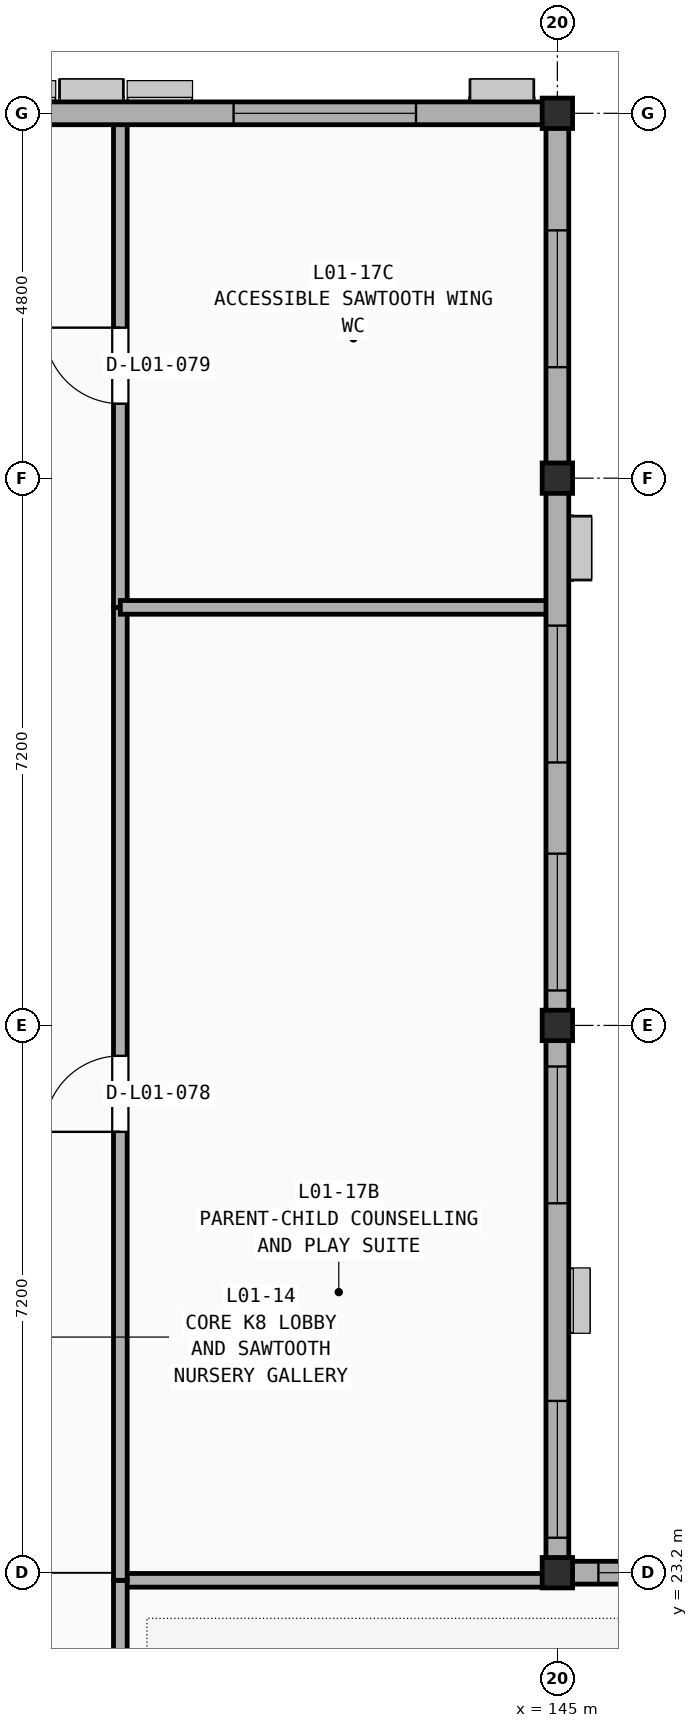
"""IFC4 building model, lengths in metres.
Left out: names, types, materials, properties, quantities, classifications, styles, units other than length and angle.
Written with IfcOpenShell. Run it as: python <this file> out.ifc"""

import sys

from ifc_helpers import new_model, si_unit, direction, frame, frame_2d, origin, origin_2d, place, context, subcontext, project, spatial, rectangle, extrude, element, fill, save


model = new_model("IFC4")
c1 = context("Model", 3, precision=1e-05, world=origin(), true_north=direction((0.0, 1.0)))
c2 = subcontext(c1, "Body", "Model", "MODEL_VIEW")
j1 = project(units=[si_unit("LENGTHUNIT", "METRE"), si_unit("PLANEANGLEUNIT", "RADIAN")], contexts=[c1])
p1 = place(None, origin())
s1 = spatial("IfcSite", under=j1, at=p1, CompositionType="ELEMENT")
p2 = place(p1, origin())
s2 = spatial("IfcBuilding", under=s1, at=p2, CompositionType="ELEMENT")
p3 = place(p2, frame((0.0, 0.0, 5.4)))
s3 = spatial("IfcBuildingStorey", under=s2, at=p3, CompositionType="ELEMENT", Elevation=5.4)
for number, where, z_axis, x_axis in (
    (1, (145.0, 23.2, 0.0), (0.0, 0.0, 1.0), (1.0, 0.0, 0.0)),
    (2, (145.0, 30.4, 0.0), (0.0, 0.0, 1.0), (1.0, 0.0, 0.0)),
    (3, (145.0, 37.6, 0.0), (0.0, 0.0, 1.0), (1.0, 0.0, 0.0)),
    (4, (145.0, 42.4, 0.0), (0.0, 0.0, 1.0), (1.0, 0.0, 0.0)),
):
    element("IfcColumn", number, at=place(p3, frame(where, z_axis=z_axis, x_axis=x_axis)), inside=s3, PredefinedType="COLUMN", context=c2, shape_type="SweptSolid", body=[
        extrude(rectangle(XDim=0.4, YDim=0.4, at=origin_2d()), origin(), (0.0, 0.0, 1.0), 4.2),
    ])
p4 = place(p3, frame((139.25, 23.1, 0.0), z_axis=(0.0, 0.0, 1.0), x_axis=(1.0, 0.0, 0.0)))
e5 = element("IfcWall", 5, at=p4, inside=s3, PredefinedType="PARTITIONING", context=c2, shape_type="SweptSolid", body=[
    extrude(rectangle(XDim=5.61, YDim=0.18, at=frame_2d((2.805, 0.0))), origin(), (0.0, 0.0, 1.0), 3.59),
])
p5 = place(p3, frame((139.25, 16.65, 0.0), z_axis=(0.0, 0.0, 1.0), x_axis=(0.0, 1.0, 0.0)))
e6 = element("IfcWall", 6, at=p5, inside=s3, PredefinedType="PARTITIONING", context=c2, shape_type="SweptSolid", body=[
    extrude(rectangle(XDim=6.45, YDim=0.18, at=frame_2d((3.225, 0.0))), origin(), (0.0, 0.0, 1.0), 3.67),
])
p6 = place(p3, frame((139.25, 23.1, 0.0), z_axis=(0.0, 0.0, 1.0), x_axis=(0.0, 1.0, 0.0)))
e7 = element("IfcWall", 7, at=p6, inside=s3, PredefinedType="PARTITIONING", context=c2, shape_type="SweptSolid", body=[
    extrude(rectangle(XDim=12.8, YDim=0.18, at=frame_2d((6.4, 0.0))), origin(), (0.0, 0.0, 1.0), 3.67),
])
p7 = place(p6, frame((5.9, 0.0, -0.01)))
e8 = element("IfcOpeningElement", 8, at=p7, cuts=e7, PredefinedType="OPENING", context=c2, shape_type="SweptSolid", body=[
    extrude(rectangle(XDim=1.0, YDim=2.16, at=frame_2d((0.5, 1.08))), frame((0.0, 0.1, 0.0), z_axis=(0.0, -1.0, 0.0), x_axis=(1.0, 0.0, 0.0)), (0.0, 0.0, 1.0), 0.2),
])
p8 = place(p3, frame((139.25, 35.9, 0.0), z_axis=(0.0, 0.0, 1.0), x_axis=(0.0, 1.0, 0.0)))
e9 = element("IfcWall", 9, at=p8, inside=s3, PredefinedType="PARTITIONING", context=c2, shape_type="SweptSolid", body=[
    extrude(rectangle(XDim=6.36, YDim=0.18, at=frame_2d((3.18, 0.0))), origin(), (0.0, 0.0, 1.0), 3.67),
])
p9 = place(p8, frame((2.68, 0.0, -0.01)))
e10 = element("IfcOpeningElement", 10, at=p9, cuts=e9, PredefinedType="OPENING", context=c2, shape_type="SweptSolid", body=[
    extrude(rectangle(XDim=1.0, YDim=2.16, at=frame_2d((0.5, 1.08))), frame((0.0, 0.1, 0.0), z_axis=(0.0, -1.0, 0.0), x_axis=(1.0, 0.0, 0.0)), (0.0, 0.0, 1.0), 0.2),
])
p10 = place(p3, frame((139.25, 35.9, 0.0), z_axis=(0.0, 0.0, 1.0), x_axis=(1.0, 0.0, 0.0)))
e11 = element("IfcWall", 11, at=p10, inside=s3, PredefinedType="PARTITIONING", context=c2, shape_type="SweptSolid", body=[
    extrude(rectangle(XDim=5.61, YDim=0.18, at=frame_2d((2.805, 0.0))), origin(), (0.0, 0.0, 1.0), 3.59),
])
p11 = place(p3, frame((152.8, 23.2, 0.0), z_axis=(0.0, 0.0, 1.0), x_axis=(-1.0, 0.0, 0.0)))
e12 = element("IfcWall", 12, at=p11, inside=s3, PredefinedType="SOLIDWALL", context=c2, shape_type="SweptSolid", body=[
    extrude(rectangle(XDim=7.8, YDim=0.3, at=frame_2d((3.9, 0.0))), origin(), (0.0, 0.0, 1.0), 3.59),
])
p12 = place(p11, frame((0.46, 0.0, 0.9)))
e13 = element("IfcOpeningElement", 13, at=p12, cuts=e12, PredefinedType="OPENING", context=c2, shape_type="SweptSolid", body=[
    extrude(rectangle(XDim=2.4, YDim=2.25, at=frame_2d((1.2, 1.125))), frame((0.0, 0.16, 0.0), z_axis=(0.0, -1.0, 0.0), x_axis=(1.0, 0.0, 0.0)), (0.0, 0.0, 1.0), 0.32),
])
p13 = place(p11, frame((4.86, 0.0, 0.9)))
e14 = element("IfcOpeningElement", 14, at=p13, cuts=e12, PredefinedType="OPENING", context=c2, shape_type="SweptSolid", body=[
    extrude(rectangle(XDim=2.4, YDim=2.25, at=frame_2d((1.2, 1.125))), frame((0.0, 0.16, 0.0), z_axis=(0.0, -1.0, 0.0), x_axis=(1.0, 0.0, 0.0)), (0.0, 0.0, 1.0), 0.32),
])
p14 = place(p3, frame((145.0, 42.4, 0.0), z_axis=(0.0, 0.0, 1.0), x_axis=(-1.0, 0.0, 0.0)))
e15 = element("IfcWall", 15, at=p14, inside=s3, PredefinedType="SOLIDWALL", context=c2, shape_type="SweptSolid", body=[
    extrude(rectangle(XDim=7.8, YDim=0.3, at=frame_2d((3.9, 0.0))), origin(), (0.0, 0.0, 1.0), 3.59),
])
p15 = place(p14, frame((1.86, 0.0, 0.9)))
e16 = element("IfcOpeningElement", 16, at=p15, cuts=e15, PredefinedType="OPENING", context=c2, shape_type="SweptSolid", body=[
    extrude(rectangle(XDim=2.4, YDim=2.25, at=frame_2d((1.2, 1.125))), frame((0.0, 0.16, 0.0), z_axis=(0.0, -1.0, 0.0), x_axis=(1.0, 0.0, 0.0)), (0.0, 0.0, 1.0), 0.32),
])
p16 = place(p3, frame((145.0, 23.2, 0.0), z_axis=(0.0, 0.0, 1.0), x_axis=(0.0, 1.0, 0.0)))
e17 = element("IfcWall", 17, at=p16, inside=s3, PredefinedType="SOLIDWALL", context=c2, shape_type="SweptSolid", body=[
    extrude(rectangle(XDim=7.2, YDim=0.3, at=frame_2d((3.6, 0.0))), origin(), (0.0, 0.0, 1.0), 3.59),
])
p17 = place(p16, frame((0.46, 0.0, 0.9)))
e18 = element("IfcOpeningElement", 18, at=p17, cuts=e17, PredefinedType="OPENING", context=c2, shape_type="SweptSolid", body=[
    extrude(rectangle(XDim=1.8, YDim=2.25, at=frame_2d((0.9, 1.125))), frame((0.0, 0.16, 0.0), z_axis=(0.0, -1.0, 0.0), x_axis=(1.0, 0.0, 0.0)), (0.0, 0.0, 1.0), 0.32),
])
p18 = place(p16, frame((4.86, 0.0, 0.9)))
e19 = element("IfcOpeningElement", 19, at=p18, cuts=e17, PredefinedType="OPENING", context=c2, shape_type="SweptSolid", body=[
    extrude(rectangle(XDim=1.8, YDim=2.25, at=frame_2d((0.9, 1.125))), frame((0.0, 0.16, 0.0), z_axis=(0.0, -1.0, 0.0), x_axis=(1.0, 0.0, 0.0)), (0.0, 0.0, 1.0), 0.32),
])
p19 = place(p3, frame((145.0, 30.4, 0.0), z_axis=(0.0, 0.0, 1.0), x_axis=(0.0, 1.0, 0.0)))
e20 = element("IfcWall", 20, at=p19, inside=s3, PredefinedType="SOLIDWALL", context=c2, shape_type="SweptSolid", body=[
    extrude(rectangle(XDim=7.2, YDim=0.3, at=frame_2d((3.6, 0.0))), origin(), (0.0, 0.0, 1.0), 3.59),
])
p20 = place(p19, frame((0.46, 0.0, 0.9)))
e21 = element("IfcOpeningElement", 21, at=p20, cuts=e20, PredefinedType="OPENING", context=c2, shape_type="SweptSolid", body=[
    extrude(rectangle(XDim=1.8, YDim=2.25, at=frame_2d((0.9, 1.125))), frame((0.0, 0.16, 0.0), z_axis=(0.0, -1.0, 0.0), x_axis=(1.0, 0.0, 0.0)), (0.0, 0.0, 1.0), 0.32),
])
p21 = place(p19, frame((3.46, 0.0, 0.9)))
e22 = element("IfcOpeningElement", 22, at=p21, cuts=e20, PredefinedType="OPENING", context=c2, shape_type="SweptSolid", body=[
    extrude(rectangle(XDim=1.8, YDim=2.25, at=frame_2d((0.9, 1.125))), frame((0.0, 0.16, 0.0), z_axis=(0.0, -1.0, 0.0), x_axis=(1.0, 0.0, 0.0)), (0.0, 0.0, 1.0), 0.32),
])
p22 = place(p3, frame((145.0, 37.6, 0.0), z_axis=(0.0, 0.0, 1.0), x_axis=(0.0, 1.0, 0.0)))
e23 = element("IfcWall", 23, at=p22, inside=s3, PredefinedType="SOLIDWALL", context=c2, shape_type="SweptSolid", body=[
    extrude(rectangle(XDim=4.8, YDim=0.3, at=frame_2d((2.4, 0.0))), origin(), (0.0, 0.0, 1.0), 3.59),
])
p23 = place(p22, frame((1.46, 0.0, 0.9)))
e24 = element("IfcOpeningElement", 24, at=p23, cuts=e23, PredefinedType="OPENING", context=c2, shape_type="SweptSolid", body=[
    extrude(rectangle(XDim=1.8, YDim=2.25, at=frame_2d((0.9, 1.125))), frame((0.0, 0.16, 0.0), z_axis=(0.0, -1.0, 0.0), x_axis=(1.0, 0.0, 0.0)), (0.0, 0.0, 1.0), 0.32),
])
p24 = place(p7, frame((1.0, 0.0, 0.01), z_axis=(0.0, 0.0, 1.0), x_axis=(-1.0, 0.0, 0.0)))
e25 = element("IfcDoor", 25, at=p24, inside=s3, OperationType="SINGLE_SWING_LEFT", PredefinedType="DOOR", context=c2, shape_type="SweptSolid", body=[
    extrude(rectangle(XDim=1.0, YDim=2.15, at=frame_2d((0.5, 1.075))), frame((0.0, 0.025, 0.0), z_axis=(0.0, -1.0, 0.0), x_axis=(1.0, 0.0, 0.0)), (0.0, 0.0, 1.0), 0.05),
])
fill(e8, e25)
p25 = place(p9, frame((0.0, 0.0, 0.01)))
e26 = element("IfcDoor", 26, at=p25, inside=s3, OperationType="SINGLE_SWING_RIGHT", PredefinedType="DOOR", context=c2, shape_type="SweptSolid", body=[
    extrude(rectangle(XDim=1.0, YDim=2.15, at=frame_2d((0.5, 1.075))), frame((0.0, 0.025, 0.0), z_axis=(0.0, -1.0, 0.0), x_axis=(1.0, 0.0, 0.0)), (0.0, 0.0, 1.0), 0.05),
])
fill(e10, e26)
p26 = place(p13, origin())
e27 = element("IfcWindow", 27, at=p26, inside=s3, PartitioningType="TRIPLE_PANEL_VERTICAL", PredefinedType="WINDOW", context=c2, shape_type="SweptSolid", body=[
    extrude(rectangle(XDim=2.4, YDim=2.25, at=frame_2d((1.2, 1.125))), frame((0.0, 0.03, 0.0), z_axis=(0.0, -1.0, 0.0), x_axis=(1.0, 0.0, 0.0)), (0.0, 0.0, 1.0), 0.06),
])
fill(e14, e27)
p27 = place(p15, origin())
e28 = element("IfcWindow", 28, at=p27, inside=s3, PartitioningType="TRIPLE_PANEL_VERTICAL", PredefinedType="WINDOW", context=c2, shape_type="SweptSolid", body=[
    extrude(rectangle(XDim=2.4, YDim=2.25, at=frame_2d((1.2, 1.125))), frame((0.0, 0.03, 0.0), z_axis=(0.0, -1.0, 0.0), x_axis=(1.0, 0.0, 0.0)), (0.0, 0.0, 1.0), 0.06),
])
fill(e16, e28)
p28 = place(p17, origin())
e29 = element("IfcWindow", 29, at=p28, inside=s3, PartitioningType="DOUBLE_PANEL_VERTICAL", PredefinedType="WINDOW", context=c2, shape_type="SweptSolid", body=[
    extrude(rectangle(XDim=1.8, YDim=2.25, at=frame_2d((0.9, 1.125))), frame((0.0, 0.03, 0.0), z_axis=(0.0, -1.0, 0.0), x_axis=(1.0, 0.0, 0.0)), (0.0, 0.0, 1.0), 0.06),
])
fill(e18, e29)
p29 = place(p18, origin())
e30 = element("IfcWindow", 30, at=p29, inside=s3, PartitioningType="DOUBLE_PANEL_VERTICAL", PredefinedType="WINDOW", context=c2, shape_type="SweptSolid", body=[
    extrude(rectangle(XDim=1.8, YDim=2.25, at=frame_2d((0.9, 1.125))), frame((0.0, 0.03, 0.0), z_axis=(0.0, -1.0, 0.0), x_axis=(1.0, 0.0, 0.0)), (0.0, 0.0, 1.0), 0.06),
])
fill(e19, e30)
p30 = place(p20, origin())
e31 = element("IfcWindow", 31, at=p30, inside=s3, PartitioningType="DOUBLE_PANEL_VERTICAL", PredefinedType="WINDOW", context=c2, shape_type="SweptSolid", body=[
    extrude(rectangle(XDim=1.8, YDim=2.25, at=frame_2d((0.9, 1.125))), frame((0.0, 0.03, 0.0), z_axis=(0.0, -1.0, 0.0), x_axis=(1.0, 0.0, 0.0)), (0.0, 0.0, 1.0), 0.06),
])
fill(e21, e31)
p31 = place(p21, origin())
e32 = element("IfcWindow", 32, at=p31, inside=s3, PartitioningType="DOUBLE_PANEL_VERTICAL", PredefinedType="WINDOW", context=c2, shape_type="SweptSolid", body=[
    extrude(rectangle(XDim=1.8, YDim=2.25, at=frame_2d((0.9, 1.125))), frame((0.0, 0.03, 0.0), z_axis=(0.0, -1.0, 0.0), x_axis=(1.0, 0.0, 0.0)), (0.0, 0.0, 1.0), 0.06),
])
fill(e22, e32)
p32 = place(p23, origin())
e33 = element("IfcWindow", 33, at=p32, inside=s3, PartitioningType="DOUBLE_PANEL_VERTICAL", PredefinedType="WINDOW", context=c2, shape_type="SweptSolid", body=[
    extrude(rectangle(XDim=1.8, YDim=2.25, at=frame_2d((0.9, 1.125))), frame((0.0, 0.03, 0.0), z_axis=(0.0, -1.0, 0.0), x_axis=(1.0, 0.0, 0.0)), (0.0, 0.0, 1.0), 0.06),
])
fill(e24, e33)
save(model, sys.argv[1])
